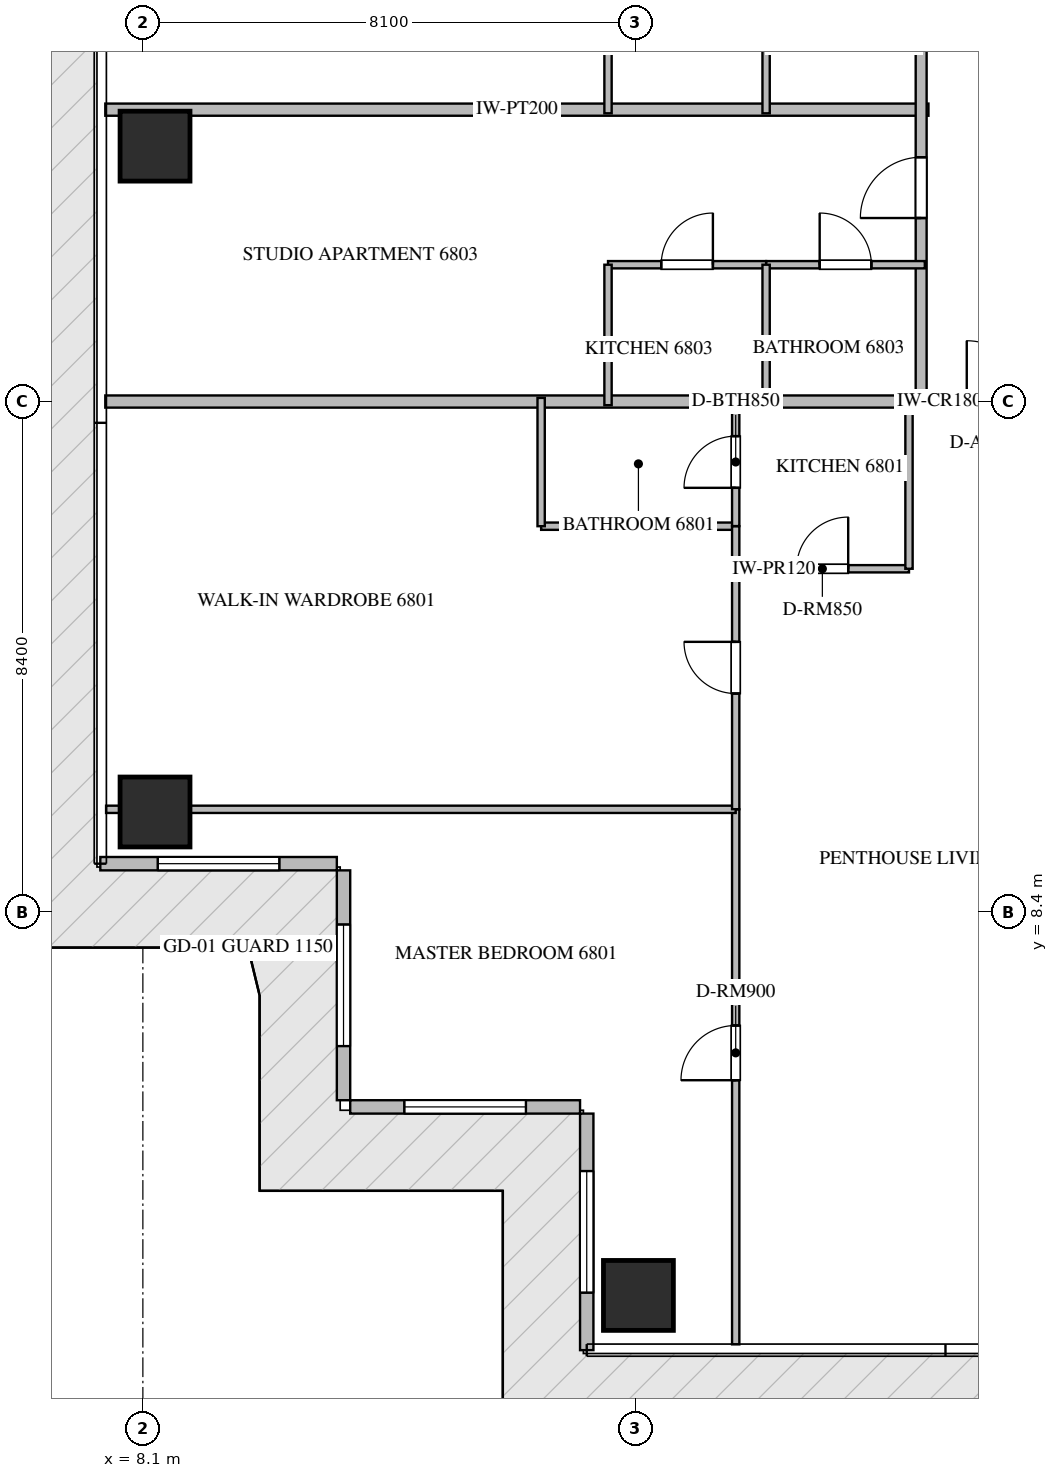
"""IFC4 building model, lengths in metres.
Left out: names, types, materials, properties, quantities, classifications, styles, units other than length and angle.
Written with IfcOpenShell. Run it as: python <this file> out.ifc"""

import sys

from ifc_helpers import new_model, si_unit, direction, frame, frame_2d, origin, origin_2d, place, context, subcontext, project, spatial, rectangle, extrude, source, transform, mapped, element, fill, save


model = new_model("IFC4")
c1 = context("Model", 3, precision=1e-05, world=origin(), true_north=direction((0.0, 1.0)))
c2 = subcontext(c1, "Body", "Model", "MODEL_VIEW")
j1 = project(units=[si_unit("LENGTHUNIT", "METRE"), si_unit("PLANEANGLEUNIT", "RADIAN")], contexts=[c1])
p1 = place(None, origin())
s1 = spatial("IfcSite", under=j1, at=p1, CompositionType="ELEMENT")
p2 = place(p1, origin())
s2 = spatial("IfcBuilding", under=s1, at=p2, CompositionType="ELEMENT")
p3 = place(p2, frame((0.0, 0.0, 272.05)))
s3 = spatial("IfcBuildingStorey", under=s2, at=p3, CompositionType="ELEMENT", Elevation=272.05)
m1 = source(origin(), c2, "Body", "SweptSolid", [
    extrude(rectangle(XDim=1.15, YDim=1.15, at=origin_2d()), origin(), (0.0, 0.0, 1.0), 3.85),
])
for number, where, z_axis, x_axis in (
    (1, (16.25, 2.1, -0.26), (0.0, 0.0, 1.0), (1.0, 0.0, 0.0)),
    (2, (8.3, 10.05, -0.26), (0.0, 0.0, 1.0), (1.0, 0.0, 0.0)),
    (3, (8.3, 21.0, -0.26), (0.0, 0.0, 1.0), (1.0, 0.0, 0.0)),
):
    element("IfcColumn", number, at=place(p3, frame(where, z_axis=z_axis, x_axis=x_axis)), inside=s3, PredefinedType="COLUMN", context=c2, shape_type="MappedRepresentation", body=[
        mapped(m1, transform((0.0, 0.0, 0.0), scale=1.0)),
    ])
p4 = place(p3, frame((7.4, 9.2, 0.0), z_axis=(0.0, 0.0, 1.0), x_axis=(1.0, 0.0, 0.0)))
e4 = element("IfcWall", 4, at=p4, inside=s3, PredefinedType="ELEMENTEDWALL", context=c2, shape_type="SweptSolid", body=[
    extrude(rectangle(XDim=3.89, YDim=0.22, at=frame_2d((1.945, 0.0))), origin(), (0.0, 0.0, 1.0), 3.575),
])
p5 = place(p4, frame((0.945, 0.0, 0.65)))
e5 = element("IfcOpeningElement", 5, at=p5, cuts=e4, PredefinedType="OPENING", context=c2, shape_type="SweptSolid", body=[
    extrude(rectangle(XDim=2.0, YDim=2.2, at=frame_2d((1.0, 1.1))), frame((0.0, 0.12, 0.0), z_axis=(0.0, -1.0, 0.0), x_axis=(1.0, 0.0, 0.0)), (0.0, 0.0, 1.0), 0.24),
])
p6 = place(p3, frame((11.4, 9.09, 0.0), z_axis=(0.0, 0.0, 1.0), x_axis=(0.0, -1.0, 0.0)))
e6 = element("IfcWall", 6, at=p6, inside=s3, PredefinedType="ELEMENTEDWALL", context=c2, shape_type="SweptSolid", body=[
    extrude(rectangle(XDim=3.78, YDim=0.22, at=frame_2d((1.89, 0.0))), origin(), (0.0, 0.0, 1.0), 3.575),
])
p7 = place(p6, frame((0.89, 0.0, 0.65)))
e7 = element("IfcOpeningElement", 7, at=p7, cuts=e6, PredefinedType="OPENING", context=c2, shape_type="SweptSolid", body=[
    extrude(rectangle(XDim=2.0, YDim=2.2, at=frame_2d((1.0, 1.1))), frame((0.0, 0.12, 0.0), z_axis=(0.0, -1.0, 0.0), x_axis=(1.0, 0.0, 0.0)), (0.0, 0.0, 1.0), 0.24),
])
p8 = place(p3, frame((11.51, 5.2, 0.0), z_axis=(0.0, 0.0, 1.0), x_axis=(1.0, 0.0, 0.0)))
e8 = element("IfcWall", 8, at=p8, inside=s3, PredefinedType="ELEMENTEDWALL", context=c2, shape_type="SweptSolid", body=[
    extrude(rectangle(XDim=3.78, YDim=0.22, at=frame_2d((1.89, 0.0))), origin(), (0.0, 0.0, 1.0), 3.575),
])
p9 = place(p8, frame((0.89, 0.0, 0.65)))
e9 = element("IfcOpeningElement", 9, at=p9, cuts=e8, PredefinedType="OPENING", context=c2, shape_type="SweptSolid", body=[
    extrude(rectangle(XDim=2.0, YDim=2.2, at=frame_2d((1.0, 1.1))), frame((0.0, 0.12, 0.0), z_axis=(0.0, -1.0, 0.0), x_axis=(1.0, 0.0, 0.0)), (0.0, 0.0, 1.0), 0.24),
])
p10 = place(p3, frame((15.4, 5.09, 0.0), z_axis=(0.0, 0.0, 1.0), x_axis=(0.0, -1.0, 0.0)))
e10 = element("IfcWall", 10, at=p10, inside=s3, PredefinedType="ELEMENTEDWALL", context=c2, shape_type="SweptSolid", body=[
    extrude(rectangle(XDim=3.89, YDim=0.22, at=frame_2d((1.945, 0.0))), origin(), (0.0, 0.0, 1.0), 3.575),
])
p11 = place(p10, frame((0.945, 0.0, 0.65)))
e11 = element("IfcOpeningElement", 11, at=p11, cuts=e10, PredefinedType="OPENING", context=c2, shape_type="SweptSolid", body=[
    extrude(rectangle(XDim=2.0, YDim=2.2, at=frame_2d((1.0, 1.1))), frame((0.0, 0.12, 0.0), z_axis=(0.0, -1.0, 0.0), x_axis=(1.0, 0.0, 0.0)), (0.0, 0.0, 1.0), 0.24),
])
p12 = place(p3, frame((7.482, 21.6, 0.0), z_axis=(0.0, 0.0, 1.0), x_axis=(1.0, 0.0, 0.0)))
e12 = element("IfcWall", 12, at=p12, inside=s3, PredefinedType="PARTITIONING", context=c2, shape_type="SweptSolid", body=[
    extrude(rectangle(XDim=13.538, YDim=0.2, at=frame_2d((6.769, 0.0))), origin(), (0.0, 0.0, 1.0), 3.59),
])
p13 = place(p3, frame((7.482, 16.8, 0.0), z_axis=(0.0, 0.0, 1.0), x_axis=(1.0, 0.0, 0.0)))
e13 = element("IfcWall", 13, at=p13, inside=s3, PredefinedType="PARTITIONING", context=c2, shape_type="SweptSolid", body=[
    extrude(rectangle(XDim=13.418, YDim=0.2, at=frame_2d((6.709, 0.0))), origin(), (0.0, 0.0, 1.0), 3.59),
])
p14 = place(p3, frame((20.902, 16.8, 0.0), z_axis=(0.0, 0.0, 1.0), x_axis=(1.0, 0.0, 0.0)))
e14 = element("IfcWall", 14, at=p14, inside=s3, PredefinedType="PARTITIONING", context=c2, shape_type="SweptSolid", body=[
    extrude(rectangle(XDim=2.496, YDim=0.18, at=frame_2d((1.248, 0.0))), origin(), (0.0, 0.0, 1.0), 3.59),
])
p15 = place(p14, frame((0.748, 0.0, 0.0)))
e15 = element("IfcOpeningElement", 15, at=p15, cuts=e14, PredefinedType="OPENING", context=c2, shape_type="SweptSolid", body=[
    extrude(rectangle(XDim=1.0, YDim=2.15, at=frame_2d((0.5, 1.075))), frame((0.0, 0.1, 0.0), z_axis=(0.0, -1.0, 0.0), x_axis=(1.0, 0.0, 0.0)), (0.0, 0.0, 1.0), 0.2),
])
p16 = place(p3, frame((20.9, 16.8, 0.0), z_axis=(0.0, 0.0, 1.0), x_axis=(0.0, 1.0, 0.0)))
e16 = element("IfcWall", 16, at=p16, inside=s3, PredefinedType="PARTITIONING", context=c2, shape_type="SweptSolid", body=[
    extrude(rectangle(XDim=16.8, YDim=0.18, at=frame_2d((8.4, 0.0))), origin(), (0.0, 0.0, 1.0), 3.59),
])
p17 = place(p16, frame((3.018, 0.0, 0.0)))
e17 = element("IfcOpeningElement", 17, at=p17, cuts=e16, PredefinedType="OPENING", context=c2, shape_type="SweptSolid", body=[
    extrude(rectangle(XDim=1.0, YDim=2.15, at=frame_2d((0.5, 1.075))), frame((0.0, 0.1, 0.0), z_axis=(0.0, -1.0, 0.0), x_axis=(1.0, 0.0, 0.0)), (0.0, 0.0, 1.0), 0.2),
])
p18 = place(p16, frame((9.18, 0.0, 0.0)))
e18 = element("IfcOpeningElement", 18, at=p18, cuts=e16, PredefinedType="OPENING", context=c2, shape_type="SweptSolid", body=[
    extrude(rectangle(XDim=1.0, YDim=2.15, at=frame_2d((0.5, 1.075))), frame((0.0, 0.1, 0.0), z_axis=(0.0, -1.0, 0.0), x_axis=(1.0, 0.0, 0.0)), (0.0, 0.0, 1.0), 0.2),
])
p19 = place(p16, frame((14.5, 0.0, 0.0)))
e19 = element("IfcOpeningElement", 19, at=p19, cuts=e16, PredefinedType="OPENING", context=c2, shape_type="SweptSolid", body=[
    extrude(rectangle(XDim=1.0, YDim=2.15, at=frame_2d((0.5, 1.075))), frame((0.0, 0.1, 0.0), z_axis=(0.0, -1.0, 0.0), x_axis=(1.0, 0.0, 0.0)), (0.0, 0.0, 1.0), 0.2),
])
p20 = place(p3, frame((17.85, 14.05, 0.0), z_axis=(0.0, 0.0, 1.0), x_axis=(1.0, 0.0, 0.0)))
e20 = element("IfcWall", 20, at=p20, inside=s3, PredefinedType="PARTITIONING", context=c2, shape_type="SweptSolid", body=[
    extrude(rectangle(XDim=2.85, YDim=0.12, at=frame_2d((1.425, 0.0))), origin(), (0.0, 0.0, 1.0), 3.59),
])
p21 = place(p20, frame((1.0, 0.0, 0.0)))
e21 = element("IfcOpeningElement", 21, at=p21, cuts=e20, PredefinedType="OPENING", context=c2, shape_type="SweptSolid", body=[
    extrude(rectangle(XDim=0.85, YDim=2.1, at=frame_2d((0.425, 1.05))), frame((0.0, 0.07, 0.0), z_axis=(0.0, -1.0, 0.0), x_axis=(1.0, 0.0, 0.0)), (0.0, 0.0, 1.0), 0.14),
])
p22 = place(p3, frame((20.7, 14.05, 0.0), z_axis=(0.0, 0.0, 1.0), x_axis=(0.0, 1.0, 0.0)))
e22 = element("IfcWall", 22, at=p22, inside=s3, PredefinedType="PARTITIONING", context=c2, shape_type="SweptSolid", body=[
    extrude(rectangle(XDim=2.81, YDim=0.12, at=frame_2d((1.405, 0.0))), origin(), (0.0, 0.0, 1.0), 3.59),
])
p23 = place(p3, frame((17.85, 1.295, 0.0), z_axis=(0.0, 0.0, 1.0), x_axis=(0.0, 1.0, 0.0)))
e23 = element("IfcWall", 23, at=p23, inside=s3, PredefinedType="PARTITIONING", context=c2, shape_type="SweptSolid", body=[
    extrude(rectangle(XDim=8.799, YDim=0.12, at=frame_2d((4.399, 0.0))), origin(), (0.0, 0.0, 1.0), 3.59),
])
p24 = place(p23, frame((4.344, 0.0, 0.0)))
e24 = element("IfcOpeningElement", 24, at=p24, cuts=e23, PredefinedType="OPENING", context=c2, shape_type="SweptSolid", body=[
    extrude(rectangle(XDim=0.9, YDim=2.1, at=frame_2d((0.45, 1.05))), frame((0.0, 0.07, 0.0), z_axis=(0.0, -1.0, 0.0), x_axis=(1.0, 0.0, 0.0)), (0.0, 0.0, 1.0), 0.14),
])
p25 = place(p3, frame((7.495, 10.094, 0.0), z_axis=(0.0, 0.0, 1.0), x_axis=(1.0, 0.0, 0.0)))
e25 = element("IfcWall", 25, at=p25, inside=s3, PredefinedType="PARTITIONING", context=c2, shape_type="SweptSolid", body=[
    extrude(rectangle(XDim=10.355, YDim=0.12, at=frame_2d((5.177, 0.0))), origin(), (0.0, 0.0, 1.0), 3.122),
])
p26 = place(p3, frame((14.65, 14.75, 0.0), z_axis=(0.0, 0.0, 1.0), x_axis=(1.0, 0.0, 0.0)))
e26 = element("IfcWall", 26, at=p26, inside=s3, PredefinedType="PARTITIONING", context=c2, shape_type="SweptSolid", body=[
    extrude(rectangle(XDim=3.2, YDim=0.12, at=frame_2d((1.6, 0.0))), origin(), (0.0, 0.0, 1.0), 3.59),
])
p27 = place(p3, frame((14.65, 14.75, 0.0), z_axis=(0.0, 0.0, 1.0), x_axis=(0.0, 1.0, 0.0)))
e27 = element("IfcWall", 27, at=p27, inside=s3, PredefinedType="PARTITIONING", context=c2, shape_type="SweptSolid", body=[
    extrude(rectangle(XDim=2.11, YDim=0.12, at=frame_2d((1.055, 0.0))), origin(), (0.0, 0.0, 1.0), 3.59),
])
p28 = place(p3, frame((17.85, 10.096, 0.0), z_axis=(0.0, 0.0, 1.0), x_axis=(0.0, 1.0, 0.0)))
e28 = element("IfcWall", 28, at=p28, inside=s3, PredefinedType="PARTITIONING", context=c2, shape_type="SweptSolid", body=[
    extrude(rectangle(XDim=4.654, YDim=0.12, at=frame_2d((2.327, 0.0))), origin(), (0.0, 0.0, 1.0), 3.59),
])
p29 = place(p28, frame((1.902, 0.0, 0.0)))
e29 = element("IfcOpeningElement", 29, at=p29, cuts=e28, PredefinedType="OPENING", context=c2, shape_type="SweptSolid", body=[
    extrude(rectangle(XDim=0.85, YDim=2.1, at=frame_2d((0.425, 1.05))), frame((0.0, 0.07, 0.0), z_axis=(0.0, -1.0, 0.0), x_axis=(1.0, 0.0, 0.0)), (0.0, 0.0, 1.0), 0.14),
])
p30 = place(p3, frame((17.85, 14.752, 0.0), z_axis=(0.0, 0.0, 1.0), x_axis=(0.0, 1.0, 0.0)))
e30 = element("IfcWall", 30, at=p30, inside=s3, PredefinedType="PARTITIONING", context=c2, shape_type="SweptSolid", body=[
    extrude(rectangle(XDim=2.108, YDim=0.12, at=frame_2d((1.054, 0.0))), origin(), (0.0, 0.0, 1.0), 3.59),
])
p31 = place(p30, frame((0.629, 0.0, 0.0)))
e31 = element("IfcOpeningElement", 31, at=p31, cuts=e30, PredefinedType="OPENING", context=c2, shape_type="SweptSolid", body=[
    extrude(rectangle(XDim=0.85, YDim=2.1, at=frame_2d((0.425, 1.05))), frame((0.0, 0.07, 0.0), z_axis=(0.0, -1.0, 0.0), x_axis=(1.0, 0.0, 0.0)), (0.0, 0.0, 1.0), 0.14),
])
p32 = place(p3, frame((15.75, 19.05, 0.0), z_axis=(0.0, 0.0, 1.0), x_axis=(1.0, 0.0, 0.0)))
e32 = element("IfcWall", 32, at=p32, inside=s3, PredefinedType="PARTITIONING", context=c2, shape_type="SweptSolid", body=[
    extrude(rectangle(XDim=2.6, YDim=0.12, at=frame_2d((1.3, 0.0))), origin(), (0.0, 0.0, 1.0), 3.59),
])
p33 = place(p32, frame((0.875, 0.0, 0.0)))
e33 = element("IfcOpeningElement", 33, at=p33, cuts=e32, PredefinedType="OPENING", context=c2, shape_type="SweptSolid", body=[
    extrude(rectangle(XDim=0.85, YDim=2.1, at=frame_2d((0.425, 1.05))), frame((0.0, 0.07, 0.0), z_axis=(0.0, -1.0, 0.0), x_axis=(1.0, 0.0, 0.0)), (0.0, 0.0, 1.0), 0.14),
])
p34 = place(p3, frame((18.352, 19.05, 0.0), z_axis=(0.0, 0.0, 1.0), x_axis=(1.0, 0.0, 0.0)))
e34 = element("IfcWall", 34, at=p34, inside=s3, PredefinedType="PARTITIONING", context=c2, shape_type="SweptSolid", body=[
    extrude(rectangle(XDim=2.608, YDim=0.12, at=frame_2d((1.304, 0.0))), origin(), (0.0, 0.0, 1.0), 3.59),
])
p35 = place(p34, frame((0.879, 0.0, 0.0)))
e35 = element("IfcOpeningElement", 35, at=p35, cuts=e34, PredefinedType="OPENING", context=c2, shape_type="SweptSolid", body=[
    extrude(rectangle(XDim=0.85, YDim=2.1, at=frame_2d((0.425, 1.05))), frame((0.0, 0.07, 0.0), z_axis=(0.0, -1.0, 0.0), x_axis=(1.0, 0.0, 0.0)), (0.0, 0.0, 1.0), 0.14),
])
for number, where, z_axis, x_axis in (
    (36, (18.35, 16.74, 0.0), (0.0, 0.0, 1.0), (0.0, 1.0, 0.0)),
    (37, (15.75, 16.74, 0.0), (0.0, 0.0, 1.0), (0.0, 1.0, 0.0)),
):
    element("IfcWall", number, at=place(p3, frame(where, z_axis=z_axis, x_axis=x_axis)), inside=s3, PredefinedType="PARTITIONING", context=c2, shape_type="SweptSolid", body=[
        extrude(rectangle(XDim=2.31, YDim=0.12, at=frame_2d((1.155, 0.0))), origin(), (0.0, 0.0, 1.0), 3.59),
    ])
for number, where, z_axis, x_axis in (
    (38, (18.35, 21.54, 0.0), (0.0, 0.0, 1.0), (0.0, 1.0, 0.0)),
    (39, (15.75, 21.54, 0.0), (0.0, 0.0, 1.0), (0.0, 1.0, 0.0)),
):
    element("IfcWall", number, at=place(p3, frame(where, z_axis=z_axis, x_axis=x_axis)), inside=s3, PredefinedType="PARTITIONING", context=c2, shape_type="SweptSolid", body=[
        extrude(rectangle(XDim=2.81, YDim=0.12, at=frame_2d((1.405, 0.0))), origin(), (0.0, 0.0, 1.0), 3.59),
    ])
m2 = source(origin(), c2, "Body", "SweptSolid", [
    extrude(rectangle(XDim=2.0, YDim=2.2, at=frame_2d((1.0, 1.1))), frame((0.0, 0.03, 0.0), z_axis=(0.0, -1.0, 0.0), x_axis=(1.0, 0.0, 0.0)), (0.0, 0.0, 1.0), 0.06),
])
p36 = place(p5, origin())
e40 = element("IfcWindow", 40, at=p36, inside=s3, PartitioningType="SINGLE_PANEL", PredefinedType="WINDOW", context=c2, shape_type="MappedRepresentation", body=[
    mapped(m2, transform((0.0, 0.0, 0.0), scale=1.0)),
])
fill(e5, e40)
p37 = place(p7, origin())
e41 = element("IfcWindow", 41, at=p37, inside=s3, PartitioningType="SINGLE_PANEL", PredefinedType="WINDOW", context=c2, shape_type="MappedRepresentation", body=[
    mapped(m2, transform((0.0, 0.0, 0.0), scale=1.0)),
])
fill(e7, e41)
p38 = place(p9, origin())
e42 = element("IfcWindow", 42, at=p38, inside=s3, PartitioningType="SINGLE_PANEL", PredefinedType="WINDOW", context=c2, shape_type="MappedRepresentation", body=[
    mapped(m2, transform((0.0, 0.0, 0.0), scale=1.0)),
])
fill(e9, e42)
p39 = place(p11, origin())
e43 = element("IfcWindow", 43, at=p39, inside=s3, PartitioningType="SINGLE_PANEL", PredefinedType="WINDOW", context=c2, shape_type="MappedRepresentation", body=[
    mapped(m2, transform((0.0, 0.0, 0.0), scale=1.0)),
])
fill(e11, e43)
m3 = source(origin(), c2, "Body", "SweptSolid", [
    extrude(rectangle(XDim=1.0, YDim=2.15, at=frame_2d((0.5, 1.075))), frame((0.0, 0.025, 0.0), z_axis=(0.0, -1.0, 0.0), x_axis=(1.0, 0.0, 0.0)), (0.0, 0.0, 1.0), 0.05),
])
p40 = place(p15, origin())
e44 = element("IfcDoor", 44, at=p40, inside=s3, OperationType="SINGLE_SWING_LEFT", PredefinedType="DOOR", context=c2, shape_type="MappedRepresentation", body=[
    mapped(m3, transform((0.0, 0.0, 0.0), scale=1.0)),
])
fill(e15, e44)
p41 = place(p17, origin())
e45 = element("IfcDoor", 45, at=p41, inside=s3, OperationType="SINGLE_SWING_LEFT", PredefinedType="DOOR", context=c2, shape_type="MappedRepresentation", body=[
    mapped(m3, transform((0.0, 0.0, 0.0), scale=1.0)),
])
fill(e17, e45)
m4 = source(origin(), c2, "Body", "SweptSolid", [
    extrude(rectangle(XDim=0.85, YDim=2.1, at=frame_2d((0.425, 1.05))), frame((0.0, 0.025, 0.0), z_axis=(0.0, -1.0, 0.0), x_axis=(1.0, 0.0, 0.0)), (0.0, 0.0, 1.0), 0.05),
])
p42 = place(p21, origin())
e46 = element("IfcDoor", 46, at=p42, inside=s3, OperationType="SINGLE_SWING_RIGHT", PredefinedType="DOOR", context=c2, shape_type="MappedRepresentation", body=[
    mapped(m4, transform((0.0, 0.0, 0.0), scale=1.0)),
])
fill(e21, e46)
m5 = source(origin(), c2, "Body", "SweptSolid", [
    extrude(rectangle(XDim=0.9, YDim=2.1, at=frame_2d((0.45, 1.05))), frame((0.0, 0.025, 0.0), z_axis=(0.0, -1.0, 0.0), x_axis=(1.0, 0.0, 0.0)), (0.0, 0.0, 1.0), 0.05),
])
p43 = place(p24, origin())
e47 = element("IfcDoor", 47, at=p43, inside=s3, OperationType="SINGLE_SWING_LEFT", PredefinedType="DOOR", context=c2, shape_type="MappedRepresentation", body=[
    mapped(m5, transform((0.0, 0.0, 0.0), scale=1.0)),
])
fill(e24, e47)
p44 = place(p29, origin())
e48 = element("IfcDoor", 48, at=p44, inside=s3, OperationType="SINGLE_SWING_RIGHT", PredefinedType="DOOR", context=c2, shape_type="MappedRepresentation", body=[
    mapped(m4, transform((0.0, 0.0, 0.0), scale=1.0)),
])
fill(e29, e48)
p45 = place(p31, origin())
e49 = element("IfcDoor", 49, at=p45, inside=s3, OperationType="SINGLE_SWING_LEFT", PredefinedType="DOOR", context=c2, shape_type="MappedRepresentation", body=[
    mapped(m4, transform((0.0, 0.0, 0.0), scale=1.0)),
])
fill(e31, e49)
p46 = place(p33, origin())
e50 = element("IfcDoor", 50, at=p46, inside=s3, OperationType="SINGLE_SWING_RIGHT", PredefinedType="DOOR", context=c2, shape_type="MappedRepresentation", body=[
    mapped(m4, transform((0.0, 0.0, 0.0), scale=1.0)),
])
fill(e33, e50)
p47 = place(p35, origin())
e51 = element("IfcDoor", 51, at=p47, inside=s3, OperationType="SINGLE_SWING_LEFT", PredefinedType="DOOR", context=c2, shape_type="MappedRepresentation", body=[
    mapped(m4, transform((0.0, 0.0, 0.0), scale=1.0)),
])
fill(e35, e51)
save(model, sys.argv[1])
